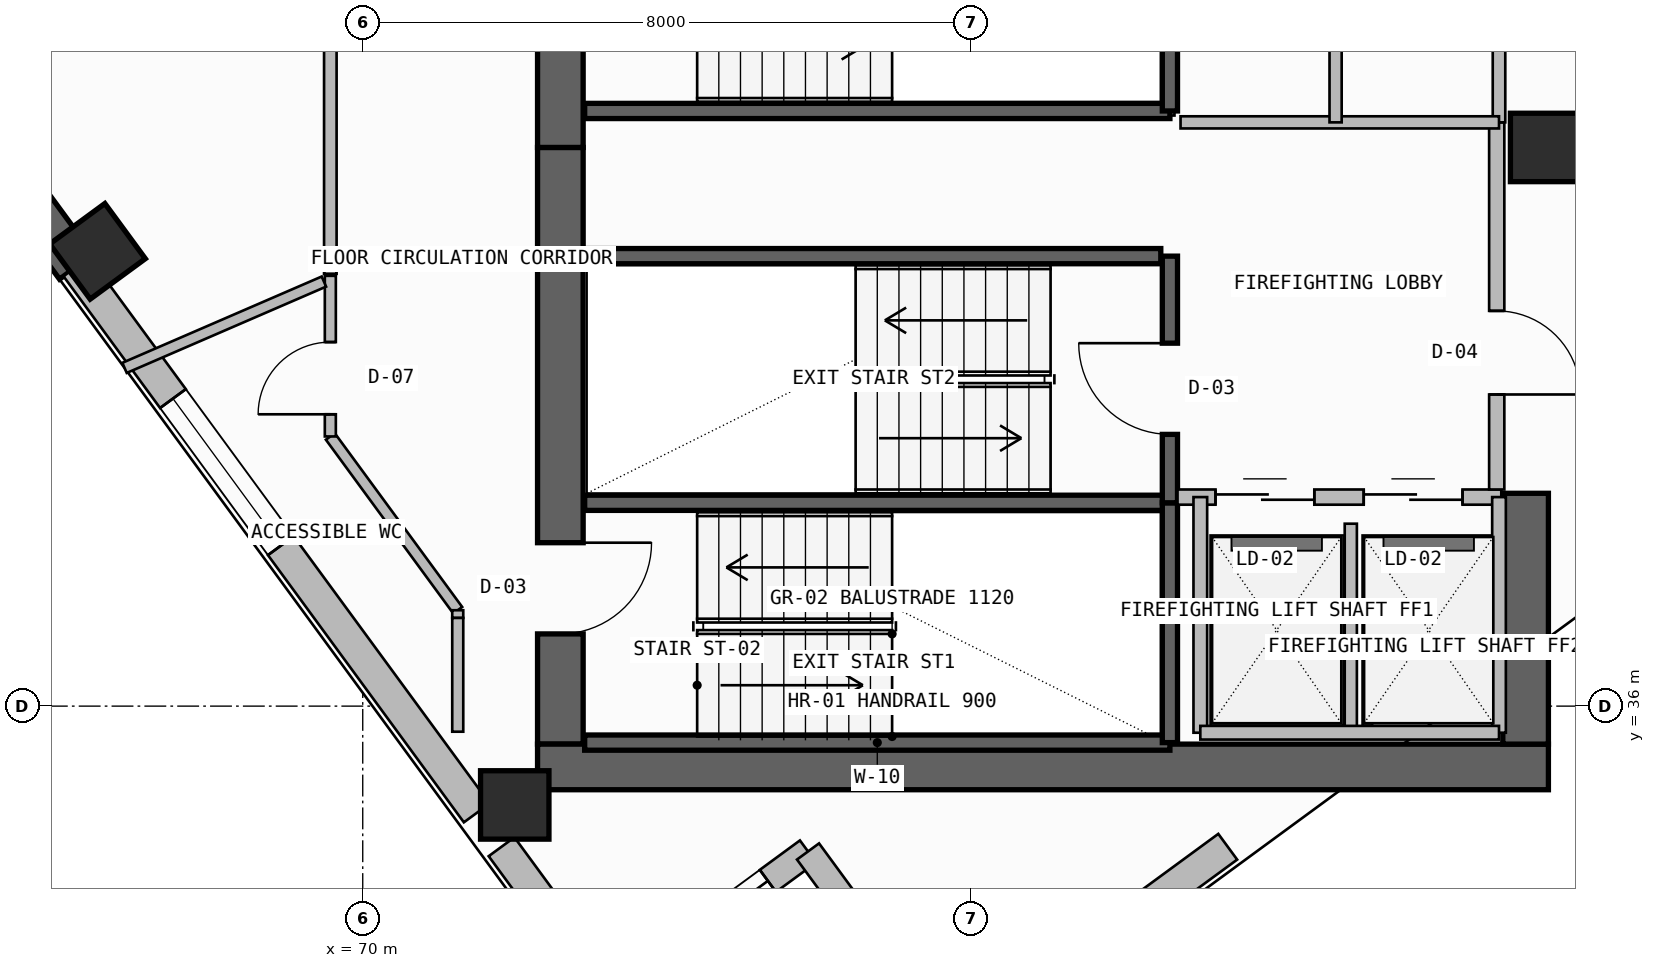
"""IFC4 building model, lengths in metres.
Left out: names, types, materials, properties, quantities, classifications, styles, units other than length and angle.
Written with IfcOpenShell. Run it as: python <this file> out.ifc"""

import sys

from ifc_helpers import new_model, si_unit, direction, frame, frame_2d, origin, origin_2d, place, context, subcontext, project, spatial, rectangle, extrude, element, fill, save


model = new_model("IFC4")
c1 = context("Model", 3, precision=1e-05, world=origin(), true_north=direction((0.0, 1.0)))
c2 = subcontext(c1, "Body", "Model", "MODEL_VIEW")
j1 = project(units=[si_unit("LENGTHUNIT", "METRE"), si_unit("PLANEANGLEUNIT", "RADIAN")], contexts=[c1])
p1 = place(None, origin())
s1 = spatial("IfcSite", under=j1, at=p1, CompositionType="ELEMENT")
p2 = place(p1, origin())
s2 = spatial("IfcBuilding", under=s1, at=p2, CompositionType="ELEMENT")
p3 = place(p2, frame((0.0, 0.0, 250.18)))
s3 = spatial("IfcBuildingStorey", under=s2, at=p3, CompositionType="ELEMENT", Elevation=250.18)
p4 = place(p3, frame((72.6, 35.5, -0.26), z_axis=(0.0, 0.0, 1.0), x_axis=(0.0, 1.0, 0.0)))
e1 = element("IfcWall", 1, at=p4, inside=s3, PredefinedType="SHEAR", context=c2, shape_type="SweptSolid", body=[
    extrude(rectangle(XDim=7.85, YDim=0.6, at=frame_2d((3.925, 0.0))), origin(), (0.0, 0.0, 1.0), 3.52),
])
p5 = place(p4, frame((1.45, 0.0, 0.26)))
e2 = element("IfcOpeningElement", 2, at=p5, cuts=e1, PredefinedType="OPENING", context=c2, shape_type="SweptSolid", body=[
    extrude(rectangle(XDim=1.2, YDim=2.2, at=frame_2d((0.6, 1.1))), frame((0.0, 0.31, 0.0), z_axis=(0.0, -1.0, 0.0), x_axis=(1.0, 0.0, 0.0)), (0.0, 0.0, 1.0), 0.62),
])
p6 = place(p3, frame((72.3, 35.2, -0.26), z_axis=(0.0, 0.0, 1.0), x_axis=(1.0, 0.0, 0.0)))
e3 = element("IfcWall", 3, at=p6, inside=s3, PredefinedType="SHEAR", context=c2, shape_type="SweptSolid", body=[
    extrude(rectangle(XDim=13.3, YDim=0.6, at=frame_2d((6.65, 0.0))), origin(), (0.0, 0.0, 1.0), 3.52),
])
p7 = place(p3, frame((85.3, 35.5, -0.26), z_axis=(0.0, 0.0, 1.0), x_axis=(0.0, 1.0, 0.0)))
e4 = element("IfcWall", 4, at=p7, inside=s3, PredefinedType="SHEAR", context=c2, shape_type="SweptSolid", body=[
    extrude(rectangle(XDim=3.3, YDim=0.6, at=frame_2d((1.65, 0.0))), origin(), (0.0, 0.0, 1.0), 3.52),
])
p8 = place(p3, frame((72.6, 43.35, -0.26), z_axis=(0.0, 0.0, 1.0), x_axis=(0.0, 1.0, 0.0)))
e5 = element("IfcWall", 5, at=p8, inside=s3, PredefinedType="SHEAR", context=c2, shape_type="SweptSolid", body=[
    extrude(rectangle(XDim=12.7, YDim=0.6, at=frame_2d((6.35, 0.0))), origin(), (0.0, 0.0, 1.0), 3.52),
])
p9 = place(p8, frame((1.35, 0.0, 0.26)))
e6 = element("IfcOpeningElement", 6, at=p9, cuts=e5, PredefinedType="OPENING", context=c2, shape_type="SweptSolid", body=[
    extrude(rectangle(XDim=1.2, YDim=2.2, at=frame_2d((0.6, 1.1))), frame((0.0, 0.31, 0.0), z_axis=(0.0, -1.0, 0.0), x_axis=(1.0, 0.0, 0.0)), (0.0, 0.0, 1.0), 0.62),
])
for number, where, z_axis, x_axis in (
    (7, (72.0, 34.7, 0.0), (0.0, 0.0, 1.0), (1.0, 0.0, 0.0)),
    (8, (85.55, 43.35, 0.0), (0.0, 0.0, 1.0), (1.0, 0.0, 0.0)),
    (9, (66.51, 41.983, 0.0), (0.0, 0.0, 1.0), (-0.591, 0.806, 0.0)),
):
    element("IfcColumn", number, at=place(p3, frame(where, z_axis=z_axis, x_axis=x_axis)), inside=s3, PredefinedType="COLUMN", context=c2, shape_type="SweptSolid", body=[
        extrude(rectangle(XDim=0.9, YDim=0.9, at=origin_2d()), origin(), (0.0, 0.0, 1.0), 3.52),
    ])
p10 = place(p3, frame((77.76, 31.495, 0.0), z_axis=(0.0, 0.0, 1.0), x_axis=(0.806458583304, 0.591290582891, 0.0)))
e10 = element("IfcWall", 10, at=p10, inside=s3, PredefinedType="SOLIDWALL", context=c2, shape_type="SweptSolid", body=[
    extrude(rectangle(XDim=4.49, YDim=0.42, at=frame_2d((2.245, 0.0))), origin(), (0.0, 0.0, 1.0), 3.26),
])
p11 = place(p3, frame((55.475, 56.45, -0.26), z_axis=(0.0, 0.0, 1.0), x_axis=(0.591309555876, -0.806444672082, 0.0)))
e11 = element("IfcWall", 11, at=p11, inside=s3, PredefinedType="SHEAR", context=c2, shape_type="SweptSolid", body=[
    extrude(rectangle(XDim=18.192, YDim=0.55, at=frame_2d((9.096, 0.0))), origin(), (0.0, 0.0, 1.0), 3.52),
])
p12 = place(p3, frame((66.232, 41.779, 0.0), z_axis=(0.0, 0.0, 1.0), x_axis=(0.591309008949, -0.806445073105, 0.0)))
e12 = element("IfcWall", 12, at=p12, inside=s3, PredefinedType="SOLIDWALL", context=c2, shape_type="SweptSolid", body=[
    extrude(rectangle(XDim=8.908, YDim=0.42, at=frame_2d((4.454, 0.0))), origin(), (0.0, 0.0, 1.0), 2.645),
])
p13 = place(p12, frame((2.149, 0.0, 1.1)))
e13 = element("IfcOpeningElement", 13, at=p13, cuts=e12, PredefinedType="OPENING", context=c2, shape_type="SweptSolid", body=[
    extrude(rectangle(XDim=2.4, YDim=1.2, at=frame_2d((1.2, 0.6))), frame((0.0, 0.22, 0.0), z_axis=(0.0, -1.0, 0.0), x_axis=(1.0, 0.0, 0.0)), (0.0, 0.0, 1.0), 0.44),
])
p14 = place(p3, frame((71.826, 34.15, 0.0), z_axis=(0.0, 0.0, 1.0), x_axis=(0.591315835946, -0.806440067308, 0.0)))
e14 = element("IfcWall", 14, at=p14, inside=s3, PredefinedType="SOLIDWALL", context=c2, shape_type="SweptSolid", body=[
    extrude(rectangle(XDim=2.434, YDim=0.42, at=frame_2d((1.217, 0.0))), origin(), (0.0, 0.0, 1.0), 3.26),
])
p15 = place(p3, frame((73.044, 32.024, 0.0), z_axis=(0.0, 0.0, 1.0), x_axis=(0.806433906667, 0.591324237774, 0.0)))
e15 = element("IfcWall", 15, at=p15, inside=s3, PredefinedType="SOLIDWALL", context=c2, shape_type="SweptSolid", body=[
    extrude(rectangle(XDim=3.49, YDim=0.36, at=frame_2d((1.745, 0.0))), origin(), (0.0, 0.0, 1.0), 3.26),
])
p16 = place(p15, frame((1.535, 0.0, 0.45)))
e16 = element("IfcOpeningElement", 16, at=p16, cuts=e15, PredefinedType="OPENING", context=c2, shape_type="SweptSolid", body=[
    extrude(rectangle(XDim=1.3, YDim=2.4, at=frame_2d((0.65, 1.2))), frame((0.0, 0.19, 0.0), z_axis=(0.0, -1.0, 0.0), x_axis=(1.0, 0.0, 0.0)), (0.0, 0.0, 1.0), 0.38),
])
p17 = place(p3, frame((75.859, 34.088, 0.0), z_axis=(0.0, 0.0, 1.0), x_axis=(0.591336371625, -0.806425009281, 0.0)))
e17 = element("IfcWall", 17, at=p17, inside=s3, PredefinedType="SOLIDWALL", context=c2, shape_type="SweptSolid", body=[
    extrude(rectangle(XDim=3.49, YDim=0.36, at=frame_2d((1.745, 0.0))), origin(), (0.0, 0.0, 1.0), 3.26),
])
for number, where, z_axis, x_axis in (
    (18, (72.92, 35.52, -0.26), (0.0, 0.0, 1.0), (1.0, 0.0, 0.0)),
    (19, (72.92, 38.675, -0.26), (0.0, 0.0, 1.0), (1.0, 0.0, 0.0)),
):
    element("IfcWall", number, at=place(p3, frame(where, z_axis=z_axis, x_axis=x_axis)), inside=s3, PredefinedType="SOLIDWALL", context=c2, shape_type="SweptSolid", body=[
        extrude(rectangle(XDim=7.7, YDim=0.2, at=frame_2d((3.85, 0.0))), origin(), (0.0, 0.0, 1.0), 3.52),
    ])
p18 = place(p3, frame((80.62, 35.52, -0.26), z_axis=(0.0, 0.0, 1.0), x_axis=(0.0, 1.0, 0.0)))
e20 = element("IfcWall", 20, at=p18, inside=s3, PredefinedType="SOLIDWALL", context=c2, shape_type="SweptSolid", body=[
    extrude(rectangle(XDim=3.155, YDim=0.2, at=frame_2d((1.578, 0.0))), origin(), (0.0, 0.0, 1.0), 3.52),
])
p19 = place(p3, frame((80.62, 38.675, -0.26), z_axis=(0.0, 0.0, 1.0), x_axis=(0.0, 1.0, 0.0)))
e21 = element("IfcWall", 21, at=p19, inside=s3, PredefinedType="SOLIDWALL", context=c2, shape_type="SweptSolid", body=[
    extrude(rectangle(XDim=3.245, YDim=0.2, at=frame_2d((1.623, 0.0))), origin(), (0.0, 0.0, 1.0), 3.52),
])
p20 = place(p19, frame((0.9, 0.0, 0.26)))
e22 = element("IfcOpeningElement", 22, at=p20, cuts=e21, PredefinedType="OPENING", context=c2, shape_type="SweptSolid", body=[
    extrude(rectangle(XDim=1.2, YDim=2.2, at=frame_2d((0.6, 1.1))), frame((0.0, 0.11, 0.0), z_axis=(0.0, -1.0, 0.0), x_axis=(1.0, 0.0, 0.0)), (0.0, 0.0, 1.0), 0.22),
])
p21 = place(p3, frame((80.72, 38.75, 0.0), z_axis=(0.0, 0.0, 1.0), x_axis=(1.0, 0.0, 0.0)))
e23 = element("IfcWall", 23, at=p21, inside=s3, PredefinedType="SOLIDWALL", context=c2, shape_type="SweptSolid", body=[
    extrude(rectangle(XDim=4.26, YDim=0.2, at=frame_2d((2.13, 0.0))), origin(), (0.0, 0.0, 1.0), 3.26),
])
p22 = place(p21, frame((0.5, 0.0, 0.0)))
e24 = element("IfcOpeningElement", 24, at=p22, cuts=e23, PredefinedType="OPENING", context=c2, shape_type="SweptSolid", body=[
    extrude(rectangle(XDim=1.3, YDim=2.3, at=frame_2d((0.65, 1.15))), frame((0.0, 0.11, 0.0), z_axis=(0.0, -1.0, 0.0), x_axis=(1.0, 0.0, 0.0)), (0.0, 0.0, 1.0), 0.22),
])
p23 = place(p21, frame((2.45, 0.0, 0.0)))
e25 = element("IfcOpeningElement", 25, at=p23, cuts=e23, PredefinedType="OPENING", context=c2, shape_type="SweptSolid", body=[
    extrude(rectangle(XDim=1.3, YDim=2.3, at=frame_2d((0.65, 1.15))), frame((0.0, 0.11, 0.0), z_axis=(0.0, -1.0, 0.0), x_axis=(1.0, 0.0, 0.0)), (0.0, 0.0, 1.0), 0.22),
])
p24 = place(p3, frame((83.0, 35.65, 0.0), z_axis=(0.0, 0.0, 1.0), x_axis=(0.0, 1.0, 0.0)))
e26 = element("IfcWall", 26, at=p24, inside=s3, PredefinedType="PLUMBINGWALL", context=c2, shape_type="SweptSolid", body=[
    extrude(rectangle(XDim=2.75, YDim=0.16, at=frame_2d((1.375, 0.0))), origin(), (0.0, 0.0, 1.0), 3.26),
])
for number, where, z_axis, x_axis in (
    (27, (84.95, 35.65, 0.0), (0.0, 0.0, 1.0), (0.0, 1.0, 0.0)),
    (28, (81.02, 35.65, 0.0), (0.0, 0.0, 1.0), (0.0, 1.0, 0.0)),
):
    element("IfcWall", number, at=place(p3, frame(where, z_axis=z_axis, x_axis=x_axis)), inside=s3, PredefinedType="SOLIDWALL", context=c2, shape_type="SweptSolid", body=[
        extrude(rectangle(XDim=3.1, YDim=0.18, at=frame_2d((1.55, 0.0))), origin(), (0.0, 0.0, 1.0), 3.26),
    ])
p25 = place(p3, frame((81.02, 35.65, 0.0), z_axis=(0.0, 0.0, 1.0), x_axis=(1.0, 0.0, 0.0)))
e29 = element("IfcWall", 29, at=p25, inside=s3, PredefinedType="SOLIDWALL", context=c2, shape_type="SweptSolid", body=[
    extrude(rectangle(XDim=3.93, YDim=0.18, at=frame_2d((1.965, 0.0))), origin(), (0.0, 0.0, 1.0), 3.26),
])
p26 = place(p3, frame((84.92, 38.85, 0.0), z_axis=(0.0, 0.0, 1.0), x_axis=(0.0, 1.0, 0.0)))
e30 = element("IfcWall", 30, at=p26, inside=s3, PredefinedType="SOLIDWALL", context=c2, shape_type="SweptSolid", body=[
    extrude(rectangle(XDim=4.83, YDim=0.2, at=frame_2d((2.415, 0.0))), origin(), (0.0, 0.0, 1.0), 3.26),
])
p27 = place(p26, frame((1.25, 0.0, 0.0)))
e31 = element("IfcOpeningElement", 31, at=p27, cuts=e30, PredefinedType="OPENING", context=c2, shape_type="SweptSolid", body=[
    extrude(rectangle(XDim=1.1, YDim=2.2, at=frame_2d((0.55, 1.1))), frame((0.0, 0.11, 0.0), z_axis=(0.0, -1.0, 0.0), x_axis=(1.0, 0.0, 0.0)), (0.0, 0.0, 1.0), 0.22),
])
p28 = place(p3, frame((72.92, 41.92, -0.26), z_axis=(0.0, 0.0, 1.0), x_axis=(1.0, 0.0, 0.0)))
e32 = element("IfcWall", 32, at=p28, inside=s3, PredefinedType="SOLIDWALL", context=c2, shape_type="SweptSolid", body=[
    extrude(rectangle(XDim=7.58, YDim=0.2, at=frame_2d((3.79, 0.0))), origin(), (0.0, 0.0, 1.0), 3.52),
])
p29 = place(p3, frame((72.92, 43.83, -0.26), z_axis=(0.0, 0.0, 1.0), x_axis=(1.0, 0.0, 0.0)))
e33 = element("IfcWall", 33, at=p29, inside=s3, PredefinedType="SOLIDWALL", context=c2, shape_type="SweptSolid", body=[
    extrude(rectangle(XDim=7.7, YDim=0.2, at=frame_2d((3.85, 0.0))), origin(), (0.0, 0.0, 1.0), 3.52),
])
p30 = place(p3, frame((80.62, 43.83, -0.26), z_axis=(0.0, 0.0, 1.0), x_axis=(0.0, 1.0, 0.0)))
e34 = element("IfcWall", 34, at=p30, inside=s3, PredefinedType="SOLIDWALL", context=c2, shape_type="SweptSolid", body=[
    extrude(rectangle(XDim=3.24, YDim=0.2, at=frame_2d((1.62, 0.0))), origin(), (0.0, 0.0, 1.0), 3.52),
])
p31 = place(p3, frame((84.95, 43.68, 0.0), z_axis=(0.0, 0.0, 1.0), x_axis=(0.0, 1.0, 0.0)))
e35 = element("IfcWall", 35, at=p31, inside=s3, PredefinedType="PLUMBINGWALL", context=c2, shape_type="SweptSolid", body=[
    extrude(rectangle(XDim=1.9, YDim=0.165, at=frame_2d((0.95, 0.0))), origin(), (0.0, 0.0, 1.0), 3.26),
])
p32 = place(p3, frame((80.76, 43.68, 0.0), z_axis=(0.0, 0.0, 1.0), x_axis=(1.0, 0.0, 0.0)))
e36 = element("IfcWall", 36, at=p32, inside=s3, PredefinedType="PLUMBINGWALL", context=c2, shape_type="SweptSolid", body=[
    extrude(rectangle(XDim=4.19, YDim=0.16, at=frame_2d((2.095, 0.0))), origin(), (0.0, 0.0, 1.0), 3.26),
])
p33 = place(p3, frame((82.8, 43.68, 0.0), z_axis=(0.0, 0.0, 1.0), x_axis=(0.0, 1.0, 0.0)))
e37 = element("IfcWall", 37, at=p33, inside=s3, PredefinedType="PLUMBINGWALL", context=c2, shape_type="SweptSolid", body=[
    extrude(rectangle(XDim=1.9, YDim=0.16, at=frame_2d((0.95, 0.0))), origin(), (0.0, 0.0, 1.0), 3.26),
])
p34 = place(p3, frame((69.573, 39.548, 0.0), z_axis=(0.0, 0.0, 1.0), x_axis=(0.591326331503, -0.806432371418, 0.0)))
e38 = element("IfcWall", 38, at=p34, inside=s3, PredefinedType="PARTITIONING", context=c2, shape_type="SweptSolid", body=[
    extrude(rectangle(XDim=2.835, YDim=0.145, at=frame_2d((1.417, 0.0))), origin(), (0.0, 0.0, 1.0), 3.26),
])
p35 = place(p3, frame((69.573, 41.661, 0.0), z_axis=(0.0, 0.0, 1.0), x_axis=(0.0, -1.0, 0.0)))
e39 = element("IfcWall", 39, at=p35, inside=s3, PredefinedType="PARTITIONING", context=c2, shape_type="SweptSolid", body=[
    extrude(rectangle(XDim=2.113, YDim=0.145, at=frame_2d((1.057, 0.0))), origin(), (0.0, 0.0, 1.0), 3.26),
])
p36 = place(p35, frame((0.872, 0.0, 0.0)))
e40 = element("IfcOpeningElement", 40, at=p36, cuts=e39, PredefinedType="OPENING", context=c2, shape_type="SweptSolid", body=[
    extrude(rectangle(XDim=0.95, YDim=2.15, at=frame_2d((0.475, 1.075))), frame((0.0, 0.083, 0.0), z_axis=(0.0, -1.0, 0.0), x_axis=(1.0, 0.0, 0.0)), (0.0, 0.0, 1.0), 0.165),
])
p37 = place(p3, frame((71.25, 37.261, 0.0), z_axis=(0.0, 0.0, 1.0), x_axis=(0.0, -1.0, 0.0)))
e41 = element("IfcWall", 41, at=p37, inside=s3, PredefinedType="PARTITIONING", context=c2, shape_type="SweptSolid", body=[
    extrude(rectangle(XDim=0.102, YDim=0.145, at=frame_2d((0.051, 0.0))), origin(), (0.0, 0.0, 1.0), 3.26),
])
p38 = place(p3, frame((66.866, 40.45, 0.0), z_axis=(0.0, 0.0, 1.0), x_axis=(0.917703061547, 0.397267027109, 0.0)))
e42 = element("IfcWall", 42, at=p38, inside=s3, PredefinedType="PARTITIONING", context=c2, shape_type="SweptSolid", body=[
    extrude(rectangle(XDim=2.858, YDim=0.145, at=frame_2d((1.429, 0.0))), origin(), (0.0, 0.0, 1.0), 3.26),
])
p39 = place(p3, frame((69.573, 49.083, 0.0), z_axis=(0.0, 0.0, 1.0), x_axis=(0.0, -1.0, 0.0)))
e43 = element("IfcWall", 43, at=p39, inside=s3, PredefinedType="PARTITIONING", context=c2, shape_type="SweptSolid", body=[
    extrude(rectangle(XDim=7.396, YDim=0.165, at=frame_2d((3.698, 0.0))), origin(), (0.0, 0.0, 1.0), 3.26),
])
p40 = place(p39, frame((3.198, 0.0, 0.0)))
e44 = element("IfcOpeningElement", 44, at=p40, cuts=e43, PredefinedType="OPENING", context=c2, shape_type="SweptSolid", body=[
    extrude(rectangle(XDim=1.0, YDim=2.2, at=frame_2d((0.5, 1.1))), frame((0.0, 0.093, 0.0), z_axis=(0.0, -1.0, 0.0), x_axis=(1.0, 0.0, 0.0)), (0.0, 0.0, 1.0), 0.185),
])
p41 = place(p3, frame((71.25, 37.16, 0.0), z_axis=(0.0, 0.0, 1.0), x_axis=(0.0, -1.0, 0.0)))
e45 = element("IfcWall", 45, at=p41, inside=s3, PredefinedType="PARTITIONING", context=c2, shape_type="SweptSolid", body=[
    extrude(rectangle(XDim=1.497, YDim=0.145, at=frame_2d((0.748, 0.0))), origin(), (0.0, 0.0, 1.0), 3.26),
])
p42 = place(p13, origin())
e46 = element("IfcWindow", 46, at=p42, inside=s3, PartitioningType="SINGLE_PANEL", PredefinedType="WINDOW", context=c2, shape_type="SweptSolid", body=[
    extrude(rectangle(XDim=2.4, YDim=1.2, at=frame_2d((1.2, 0.6))), frame((0.0, 0.03, 0.0), z_axis=(0.0, -1.0, 0.0), x_axis=(1.0, 0.0, 0.0)), (0.0, 0.0, 1.0), 0.06),
])
fill(e13, e46)
p43 = place(p16, origin())
e47 = element("IfcWindow", 47, at=p43, inside=s3, PartitioningType="SINGLE_PANEL", PredefinedType="WINDOW", context=c2, shape_type="SweptSolid", body=[
    extrude(rectangle(XDim=1.3, YDim=2.4, at=frame_2d((0.65, 1.2))), frame((0.0, 0.03, 0.0), z_axis=(0.0, -1.0, 0.0), x_axis=(1.0, 0.0, 0.0)), (0.0, 0.0, 1.0), 0.06),
])
fill(e16, e47)
p44 = place(p5, frame((1.2, 0.0, 0.0), z_axis=(0.0, 0.0, 1.0), x_axis=(-1.0, 0.0, 0.0)))
e48 = element("IfcDoor", 48, at=p44, inside=s3, OperationType="SINGLE_SWING_LEFT", PredefinedType="USERDEFINED", context=c2, shape_type="SweptSolid", body=[
    extrude(rectangle(XDim=1.2, YDim=2.2, at=frame_2d((0.6, 1.1))), frame((0.0, 0.025, 0.0), z_axis=(0.0, -1.0, 0.0), x_axis=(1.0, 0.0, 0.0)), (0.0, 0.0, 1.0), 0.05),
])
fill(e2, e48)
p45 = place(p20, origin())
e49 = element("IfcDoor", 49, at=p45, inside=s3, OperationType="SINGLE_SWING_RIGHT", PredefinedType="USERDEFINED", context=c2, shape_type="SweptSolid", body=[
    extrude(rectangle(XDim=1.2, YDim=2.2, at=frame_2d((0.6, 1.1))), frame((0.0, 0.025, 0.0), z_axis=(0.0, -1.0, 0.0), x_axis=(1.0, 0.0, 0.0)), (0.0, 0.0, 1.0), 0.05),
])
fill(e22, e49)
p46 = place(p22, origin())
e50 = element("IfcDoor", 50, at=p46, inside=s3, OperationType="DOUBLE_DOOR_SLIDING", PredefinedType="DOOR", context=c2, shape_type="SweptSolid", body=[
    extrude(rectangle(XDim=1.3, YDim=2.3, at=frame_2d((0.65, 1.15))), frame((0.0, 0.025, 0.0), z_axis=(0.0, -1.0, 0.0), x_axis=(1.0, 0.0, 0.0)), (0.0, 0.0, 1.0), 0.05),
])
fill(e24, e50)
p47 = place(p23, origin())
e51 = element("IfcDoor", 51, at=p47, inside=s3, OperationType="DOUBLE_DOOR_SLIDING", PredefinedType="DOOR", context=c2, shape_type="SweptSolid", body=[
    extrude(rectangle(XDim=1.3, YDim=2.3, at=frame_2d((0.65, 1.15))), frame((0.0, 0.025, 0.0), z_axis=(0.0, -1.0, 0.0), x_axis=(1.0, 0.0, 0.0)), (0.0, 0.0, 1.0), 0.05),
])
fill(e25, e51)
p48 = place(p27, frame((1.1, 0.0, 0.0), z_axis=(0.0, 0.0, 1.0), x_axis=(-1.0, 0.0, 0.0)))
e52 = element("IfcDoor", 52, at=p48, inside=s3, OperationType="SINGLE_SWING_RIGHT", PredefinedType="DOOR", context=c2, shape_type="SweptSolid", body=[
    extrude(rectangle(XDim=1.1, YDim=2.2, at=frame_2d((0.55, 1.1))), frame((0.0, 0.025, 0.0), z_axis=(0.0, -1.0, 0.0), x_axis=(1.0, 0.0, 0.0)), (0.0, 0.0, 1.0), 0.05),
])
fill(e31, e52)
p49 = place(p36, frame((0.95, 0.0, 0.0), z_axis=(0.0, 0.0, 1.0), x_axis=(-1.0, 0.0, 0.0)))
e53 = element("IfcDoor", 53, at=p49, inside=s3, OperationType="SINGLE_SWING_LEFT", PredefinedType="DOOR", context=c2, shape_type="SweptSolid", body=[
    extrude(rectangle(XDim=0.95, YDim=2.15, at=frame_2d((0.475, 1.075))), frame((0.0, 0.025, 0.0), z_axis=(0.0, -1.0, 0.0), x_axis=(1.0, 0.0, 0.0)), (0.0, 0.0, 1.0), 0.05),
])
fill(e40, e53)
save(model, sys.argv[1])
